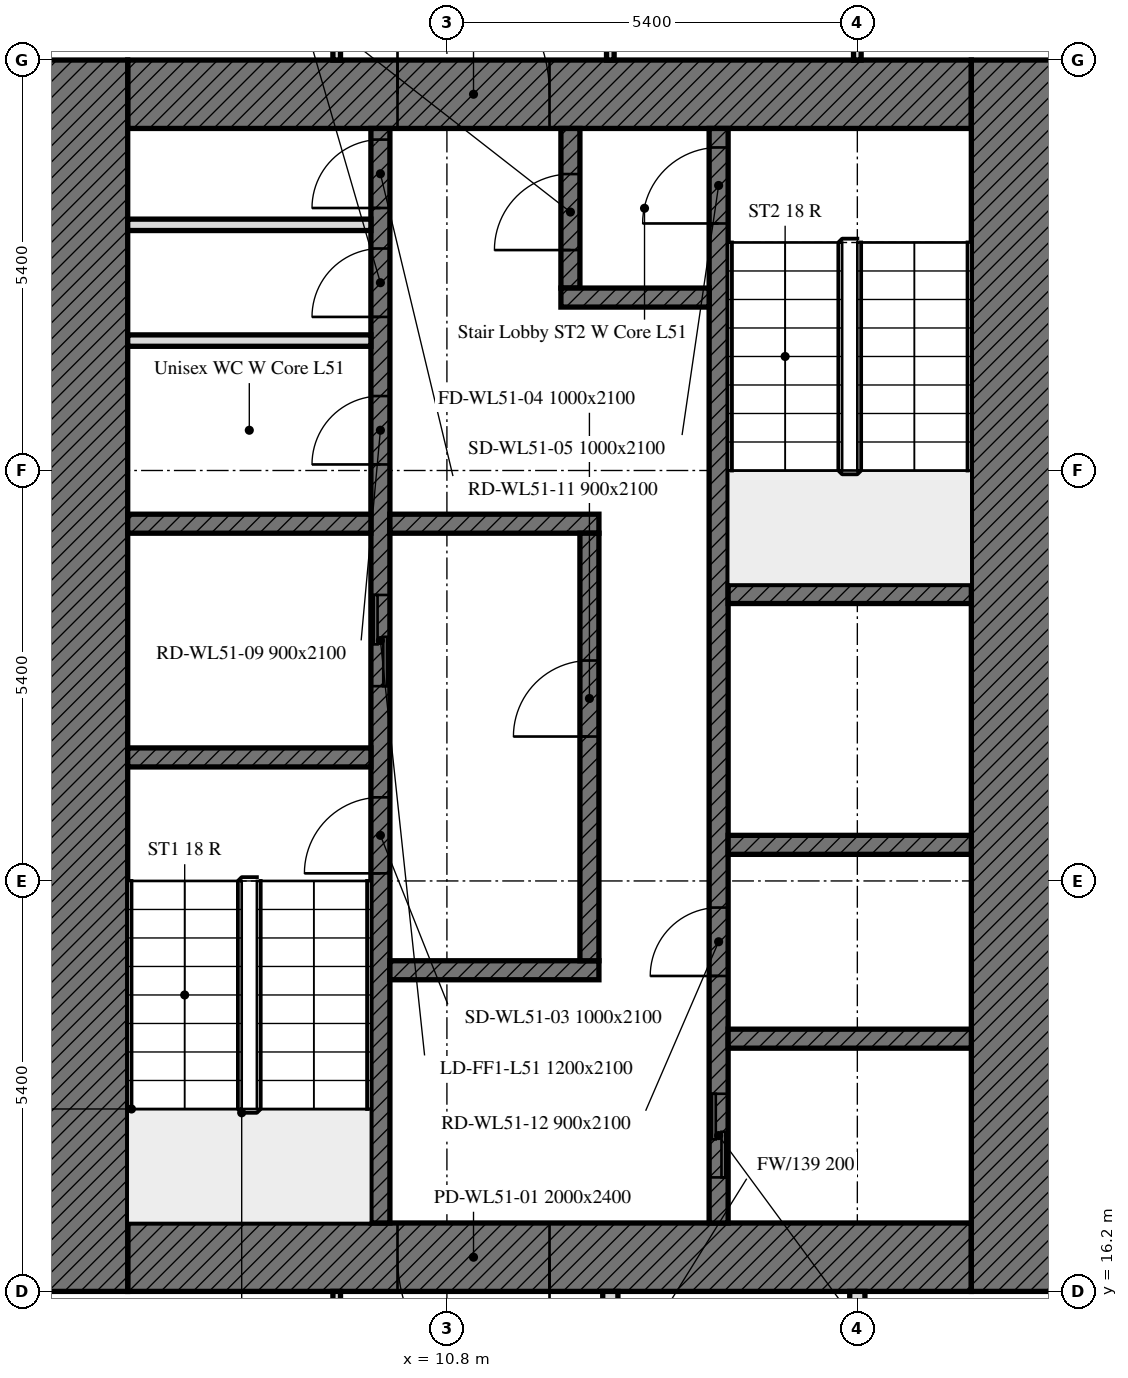
"""IFC4 building model, lengths in metres.
Left out: names, types, materials, properties, quantities, classifications, styles, units other than length and angle.
Written with IfcOpenShell. Run it as: python <this file> out.ifc"""

import sys

from ifc_helpers import new_model, si_unit, direction, frame, frame_2d, origin, place, context, subcontext, project, spatial, rectangle, extrude, element, fill, save


model = new_model("IFC4")
c1 = context("Model", 3, precision=1e-05, world=origin(), true_north=direction((0.0, 1.0)))
c2 = subcontext(c1, "Body", "Model", "MODEL_VIEW")
j1 = project(units=[si_unit("LENGTHUNIT", "METRE"), si_unit("PLANEANGLEUNIT", "RADIAN")], contexts=[c1])
p1 = place(None, origin())
s1 = spatial("IfcSite", under=j1, at=p1, CompositionType="ELEMENT")
p2 = place(p1, origin())
s2 = spatial("IfcBuilding", under=s1, at=p2, CompositionType="ELEMENT")
p3 = place(p2, frame((0.0, 0.0, 207.1)))
s3 = spatial("IfcBuildingStorey", under=s2, at=p3, CompositionType="ELEMENT", Elevation=207.1)
p4 = place(p3, frame((17.7, 16.65, 0.0), z_axis=(0.0, 0.0, 1.0), x_axis=(-1.0, 0.0, 0.0)))
e1 = element("IfcWall", 1, at=p4, inside=s3, PredefinedType="SOLIDWALL", context=c2, shape_type="SweptSolid", body=[
    extrude(rectangle(XDim=11.1, YDim=0.9, at=frame_2d((5.55, 0.0))), origin(), (0.0, 0.0, 1.0), 3.0),
])
p5 = place(p4, frame((5.55, 0.0, 0.0)))
e2 = element("IfcOpeningElement", 2, at=p5, cuts=e1, PredefinedType="OPENING", context=c2, shape_type="SweptSolid", body=[
    extrude(rectangle(XDim=2.0, YDim=2.4, at=frame_2d((1.0, 1.2))), frame((0.0, 0.45, 0.0), z_axis=(0.0, -1.0, 0.0), x_axis=(1.0, 0.0, 0.0)), (0.0, 0.0, 1.0), 0.9),
])
p6 = place(p3, frame((6.6, 31.95, 0.0), z_axis=(0.0, 0.0, 1.0), x_axis=(1.0, 0.0, 0.0)))
e3 = element("IfcWall", 3, at=p6, inside=s3, PredefinedType="SOLIDWALL", context=c2, shape_type="SweptSolid", body=[
    extrude(rectangle(XDim=11.1, YDim=0.9, at=frame_2d((5.55, 0.0))), origin(), (0.0, 0.0, 1.0), 3.0),
])
p7 = place(p6, frame((3.55, 0.0, 0.0)))
e4 = element("IfcOpeningElement", 4, at=p7, cuts=e3, PredefinedType="OPENING", context=c2, shape_type="SweptSolid", body=[
    extrude(rectangle(XDim=2.0, YDim=2.4, at=frame_2d((1.0, 1.2))), frame((0.0, 0.45, 0.0), z_axis=(0.0, -1.0, 0.0), x_axis=(1.0, 0.0, 0.0)), (0.0, 0.0, 1.0), 0.9),
])
for number, where, z_axis, x_axis in (
    (5, (6.0, 16.2, 0.0), (0.0, 0.0, 1.0), (0.0, 1.0, 0.0)),
    (6, (18.3, 32.4, 0.0), (0.0, 0.0, 1.0), (0.0, -1.0, 0.0)),
):
    element("IfcWall", number, at=place(p3, frame(where, z_axis=z_axis, x_axis=x_axis)), inside=s3, PredefinedType="SOLIDWALL", context=c2, shape_type="SweptSolid", body=[
        extrude(rectangle(XDim=16.2, YDim=1.2, at=frame_2d((8.1, 0.0))), origin(), (0.0, 0.0, 1.0), 3.0),
    ])
p8 = place(p3, frame((9.925, 17.1, 0.0), z_axis=(0.0, 0.0, 1.0), x_axis=(0.0, 1.0, 0.0)))
e7 = element("IfcWall", 7, at=p8, inside=s3, PredefinedType="SOLIDWALL", context=c2, shape_type="SweptSolid", body=[
    extrude(rectangle(XDim=14.4, YDim=0.25, at=frame_2d((7.2, 0.0))), origin(), (0.0, 0.0, 1.0), 3.0),
])
p9 = place(p8, frame((4.6, 0.0, 0.0)))
e8 = element("IfcOpeningElement", 8, at=p9, cuts=e7, PredefinedType="OPENING", context=c2, shape_type="SweptSolid", body=[
    extrude(rectangle(XDim=1.0, YDim=2.1, at=frame_2d((0.5, 1.05))), frame((0.0, 0.125, 0.0), z_axis=(0.0, -1.0, 0.0), x_axis=(1.0, 0.0, 0.0)), (0.0, 0.0, 1.0), 0.25),
])
p10 = place(p8, frame((7.062, 0.0, 0.0)))
e9 = element("IfcOpeningElement", 9, at=p10, cuts=e7, PredefinedType="OPENING", context=c2, shape_type="SweptSolid", body=[
    extrude(rectangle(XDim=1.2, YDim=2.1, at=frame_2d((0.6, 1.05))), frame((0.0, 0.125, 0.0), z_axis=(0.0, -1.0, 0.0), x_axis=(1.0, 0.0, 0.0)), (0.0, 0.0, 1.0), 0.25),
])
p11 = place(p8, frame((9.979, 0.0, 0.0)))
e10 = element("IfcOpeningElement", 10, at=p11, cuts=e7, PredefinedType="OPENING", context=c2, shape_type="SweptSolid", body=[
    extrude(rectangle(XDim=0.9, YDim=2.1, at=frame_2d((0.45, 1.05))), frame((0.0, 0.125, 0.0), z_axis=(0.0, -1.0, 0.0), x_axis=(1.0, 0.0, 0.0)), (0.0, 0.0, 1.0), 0.25),
])
p12 = place(p8, frame((11.92, 0.0, 0.0)))
e11 = element("IfcOpeningElement", 11, at=p12, cuts=e7, PredefinedType="OPENING", context=c2, shape_type="SweptSolid", body=[
    extrude(rectangle(XDim=0.9, YDim=2.1, at=frame_2d((0.45, 1.05))), frame((0.0, 0.125, 0.0), z_axis=(0.0, -1.0, 0.0), x_axis=(1.0, 0.0, 0.0)), (0.0, 0.0, 1.0), 0.25),
])
p13 = place(p8, frame((13.354, 0.0, 0.0)))
e12 = element("IfcOpeningElement", 12, at=p13, cuts=e7, PredefinedType="OPENING", context=c2, shape_type="SweptSolid", body=[
    extrude(rectangle(XDim=0.9, YDim=2.1, at=frame_2d((0.45, 1.05))), frame((0.0, 0.125, 0.0), z_axis=(0.0, -1.0, 0.0), x_axis=(1.0, 0.0, 0.0)), (0.0, 0.0, 1.0), 0.25),
])
p14 = place(p3, frame((14.375, 17.1, 0.0), z_axis=(0.0, 0.0, 1.0), x_axis=(0.0, 1.0, 0.0)))
e13 = element("IfcWall", 13, at=p14, inside=s3, PredefinedType="SOLIDWALL", context=c2, shape_type="SweptSolid", body=[
    extrude(rectangle(XDim=14.4, YDim=0.25, at=frame_2d((7.2, 0.0))), origin(), (0.0, 0.0, 1.0), 3.0),
])
p15 = place(p14, frame((13.15, 0.0, 0.0)))
e14 = element("IfcOpeningElement", 14, at=p15, cuts=e13, PredefinedType="OPENING", context=c2, shape_type="SweptSolid", body=[
    extrude(rectangle(XDim=1.0, YDim=2.1, at=frame_2d((0.5, 1.05))), frame((0.0, 0.125, 0.0), z_axis=(0.0, -1.0, 0.0), x_axis=(1.0, 0.0, 0.0)), (0.0, 0.0, 1.0), 0.25),
])
p16 = place(p14, frame((0.6, 0.0, 0.0)))
e15 = element("IfcOpeningElement", 15, at=p16, cuts=e13, PredefinedType="OPENING", context=c2, shape_type="SweptSolid", body=[
    extrude(rectangle(XDim=1.1, YDim=2.1, at=frame_2d((0.55, 1.05))), frame((0.0, 0.125, 0.0), z_axis=(0.0, -1.0, 0.0), x_axis=(1.0, 0.0, 0.0)), (0.0, 0.0, 1.0), 0.25),
])
p17 = place(p14, frame((3.25, 0.0, 0.0)))
e16 = element("IfcOpeningElement", 16, at=p17, cuts=e13, PredefinedType="OPENING", context=c2, shape_type="SweptSolid", body=[
    extrude(rectangle(XDim=0.9, YDim=2.1, at=frame_2d((0.45, 1.05))), frame((0.0, 0.125, 0.0), z_axis=(0.0, -1.0, 0.0), x_axis=(1.0, 0.0, 0.0)), (0.0, 0.0, 1.0), 0.25),
])
for number, where, z_axis, x_axis in (
    (17, (6.6, 23.225, 0.0), (0.0, 0.0, 1.0), (1.0, 0.0, 0.0)),
    (18, (14.5, 25.375, 0.0), (0.0, 0.0, 1.0), (1.0, 0.0, 0.0)),
    (19, (14.5, 22.075, 0.0), (0.0, 0.0, 1.0), (1.0, 0.0, 0.0)),
    (20, (6.6, 26.3, 0.0), (0.0, 0.0, 1.0), (1.0, 0.0, 0.0)),
):
    element("IfcWall", number, at=place(p3, frame(where, z_axis=z_axis, x_axis=x_axis)), inside=s3, PredefinedType="SOLIDWALL", context=c2, shape_type="SweptSolid", body=[
        extrude(rectangle(XDim=3.2, YDim=0.25, at=frame_2d((1.6, 0.0))), origin(), (0.0, 0.0, 1.0), 3.0),
    ])
for number, where, z_axis, x_axis in (
    (21, (10.05, 26.3, 0.0), (0.0, 0.0, 1.0), (1.0, 0.0, 0.0)),
    (22, (10.05, 20.425, 0.0), (0.0, 0.0, 1.0), (1.0, 0.0, 0.0)),
):
    element("IfcWall", number, at=place(p3, frame(where, z_axis=z_axis, x_axis=x_axis)), inside=s3, PredefinedType="SOLIDWALL", context=c2, shape_type="SweptSolid", body=[
        extrude(rectangle(XDim=2.75, YDim=0.25, at=frame_2d((1.375, 0.0))), origin(), (0.0, 0.0, 1.0), 3.0),
    ])
p18 = place(p3, frame((12.425, 29.4, 0.0), z_axis=(0.0, 0.0, 1.0), x_axis=(0.0, 1.0, 0.0)))
e23 = element("IfcWall", 23, at=p18, inside=s3, PredefinedType="SOLIDWALL", context=c2, shape_type="SweptSolid", body=[
    extrude(rectangle(XDim=2.1, YDim=0.25, at=frame_2d((1.05, 0.0))), origin(), (0.0, 0.0, 1.0), 3.0),
])
p19 = place(p18, frame((0.5, 0.0, 0.0)))
e24 = element("IfcOpeningElement", 24, at=p19, cuts=e23, PredefinedType="OPENING", context=c2, shape_type="SweptSolid", body=[
    extrude(rectangle(XDim=1.0, YDim=2.1, at=frame_2d((0.5, 1.05))), frame((0.0, 0.125, 0.0), z_axis=(0.0, -1.0, 0.0), x_axis=(1.0, 0.0, 0.0)), (0.0, 0.0, 1.0), 0.25),
])
p20 = place(p3, frame((12.3, 29.275, 0.0), z_axis=(0.0, 0.0, 1.0), x_axis=(1.0, 0.0, 0.0)))
e25 = element("IfcWall", 25, at=p20, inside=s3, PredefinedType="SOLIDWALL", context=c2, shape_type="SweptSolid", body=[
    extrude(rectangle(XDim=1.95, YDim=0.25, at=frame_2d((0.975, 0.0))), origin(), (0.0, 0.0, 1.0), 3.0),
])
p21 = place(p3, frame((12.675, 20.55, 0.0), z_axis=(0.0, 0.0, 1.0), x_axis=(0.0, 1.0, 0.0)))
e26 = element("IfcWall", 26, at=p21, inside=s3, PredefinedType="SOLIDWALL", context=c2, shape_type="SweptSolid", body=[
    extrude(rectangle(XDim=5.625, YDim=0.25, at=frame_2d((2.812, 0.0))), origin(), (0.0, 0.0, 1.0), 3.0),
])
p22 = place(p21, frame((2.95, 0.0, 0.0)))
e27 = element("IfcOpeningElement", 27, at=p22, cuts=e26, PredefinedType="OPENING", context=c2, shape_type="SweptSolid", body=[
    extrude(rectangle(XDim=1.0, YDim=2.1, at=frame_2d((0.5, 1.05))), frame((0.0, 0.125, 0.0), z_axis=(0.0, -1.0, 0.0), x_axis=(1.0, 0.0, 0.0)), (0.0, 0.0, 1.0), 0.25),
])
p23 = place(p3, frame((14.5, 19.525, 0.0), z_axis=(0.0, 0.0, 1.0), x_axis=(1.0, 0.0, 0.0)))
e28 = element("IfcWall", 28, at=p23, inside=s3, PredefinedType="SOLIDWALL", context=c2, shape_type="SweptSolid", body=[
    extrude(rectangle(XDim=3.2, YDim=0.25, at=frame_2d((1.6, 0.0))), origin(), (0.0, 0.0, 1.0), 3.0),
])
for number, where, z_axis, x_axis in (
    (29, (6.6, 28.709, 0.0), (0.0, 0.0, 1.0), (1.0, 0.0, 0.0)),
    (30, (6.6, 30.232, 0.0), (0.0, 0.0, 1.0), (1.0, 0.0, 0.0)),
):
    element("IfcWall", number, at=place(p3, frame(where, z_axis=z_axis, x_axis=x_axis)), inside=s3, PredefinedType="PARTITIONING", context=c2, shape_type="SweptSolid", body=[
        extrude(rectangle(XDim=3.2, YDim=0.15, at=frame_2d((1.6, 0.0))), origin(), (0.0, 0.0, 1.0), 3.0),
    ])
p24 = place(p3, frame((16.2, 37.405, 0.0), z_axis=(0.0, 0.0, 1.0), x_axis=(0.0, -1.0, 0.0)))
e31 = element("IfcWall", 31, at=p24, inside=s3, PredefinedType="PARTITIONING", context=c2, shape_type="SweptSolid", body=[
    extrude(rectangle(XDim=5.005, YDim=0.1, at=frame_2d((2.502, 0.0))), origin(), (0.0, 0.0, 1.0), 2.4),
])
for number, where, z_axis, x_axis in (
    (32, (12.95, 32.4, 0.0), (0.0, 0.0, 1.0), (0.0, 1.0, 0.0)),
    (33, (9.35, 38.175, 0.0), (0.0, 0.0, 1.0), (0.0, -1.0, 0.0)),
):
    element("IfcWall", number, at=place(p3, frame(where, z_axis=z_axis, x_axis=x_axis)), inside=s3, PredefinedType="PARTITIONING", context=c2, shape_type="SweptSolid", body=[
        extrude(rectangle(XDim=5.775, YDim=0.1, at=frame_2d((2.888, 0.0))), origin(), (0.0, 0.0, 1.0), 2.4),
    ])
p25 = place(p3, frame((16.2, 16.2, 0.0), z_axis=(0.0, 0.0, 1.0), x_axis=(0.0, -1.0, 0.0)))
e34 = element("IfcWall", 34, at=p25, inside=s3, PredefinedType="PARTITIONING", context=c2, shape_type="SweptSolid", body=[
    extrude(rectangle(XDim=2.8, YDim=0.2, at=frame_2d((1.4, 0.0))), origin(), (0.0, 0.0, 1.0), 3.0),
])
p26 = place(p3, frame((9.35, 16.2, 0.0), z_axis=(0.0, 0.0, 1.0), x_axis=(0.0, -1.0, 0.0)))
e35 = element("IfcWall", 35, at=p26, inside=s3, PredefinedType="PARTITIONING", context=c2, shape_type="SweptSolid", body=[
    extrude(rectangle(XDim=2.625, YDim=0.1, at=frame_2d((1.312, 0.0))), origin(), (0.0, 0.0, 1.0), 3.0),
])
p27 = place(p3, frame((12.95, 13.4, 0.0), z_axis=(0.0, 0.0, 1.0), x_axis=(0.0, 1.0, 0.0)))
e36 = element("IfcWall", 36, at=p27, inside=s3, PredefinedType="PARTITIONING", context=c2, shape_type="SweptSolid", body=[
    extrude(rectangle(XDim=2.8, YDim=0.2, at=frame_2d((1.4, 0.0))), origin(), (0.0, 0.0, 1.0), 3.0),
])
p28 = place(p5, origin())
e37 = element("IfcDoor", 37, at=p28, inside=s3, OperationType="DOUBLE_DOOR_SINGLE_SWING", PredefinedType="DOOR", context=c2, shape_type="SweptSolid", body=[
    extrude(rectangle(XDim=2.0, YDim=2.4, at=frame_2d((1.0, 1.2))), frame((0.0, 0.025, 0.0), z_axis=(0.0, -1.0, 0.0), x_axis=(1.0, 0.0, 0.0)), (0.0, 0.0, 1.0), 0.05),
])
fill(e2, e37)
p29 = place(p7, origin())
e38 = element("IfcDoor", 38, at=p29, inside=s3, OperationType="DOUBLE_DOOR_SINGLE_SWING", PredefinedType="DOOR", context=c2, shape_type="SweptSolid", body=[
    extrude(rectangle(XDim=2.0, YDim=2.4, at=frame_2d((1.0, 1.2))), frame((0.0, 0.025, 0.0), z_axis=(0.0, -1.0, 0.0), x_axis=(1.0, 0.0, 0.0)), (0.0, 0.0, 1.0), 0.05),
])
fill(e4, e38)
p30 = place(p9, origin())
e39 = element("IfcDoor", 39, at=p30, inside=s3, OperationType="SINGLE_SWING_LEFT", PredefinedType="DOOR", context=c2, shape_type="SweptSolid", body=[
    extrude(rectangle(XDim=1.0, YDim=2.1, at=frame_2d((0.5, 1.05))), frame((0.0, 0.025, 0.0), z_axis=(0.0, -1.0, 0.0), x_axis=(1.0, 0.0, 0.0)), (0.0, 0.0, 1.0), 0.05),
])
fill(e8, e39)
p31 = place(p22, origin())
e40 = element("IfcDoor", 40, at=p31, inside=s3, OperationType="SINGLE_SWING_LEFT", PredefinedType="DOOR", context=c2, shape_type="SweptSolid", body=[
    extrude(rectangle(XDim=1.0, YDim=2.1, at=frame_2d((0.5, 1.05))), frame((0.0, 0.025, 0.0), z_axis=(0.0, -1.0, 0.0), x_axis=(1.0, 0.0, 0.0)), (0.0, 0.0, 1.0), 0.05),
])
fill(e27, e40)
p32 = place(p15, origin())
e41 = element("IfcDoor", 41, at=p32, inside=s3, OperationType="SINGLE_SWING_LEFT", PredefinedType="DOOR", context=c2, shape_type="SweptSolid", body=[
    extrude(rectangle(XDim=1.0, YDim=2.1, at=frame_2d((0.5, 1.05))), frame((0.0, 0.025, 0.0), z_axis=(0.0, -1.0, 0.0), x_axis=(1.0, 0.0, 0.0)), (0.0, 0.0, 1.0), 0.05),
])
fill(e14, e41)
p33 = place(p19, origin())
e42 = element("IfcDoor", 42, at=p33, inside=s3, OperationType="SINGLE_SWING_LEFT", PredefinedType="DOOR", context=c2, shape_type="SweptSolid", body=[
    extrude(rectangle(XDim=1.0, YDim=2.1, at=frame_2d((0.5, 1.05))), frame((0.0, 0.025, 0.0), z_axis=(0.0, -1.0, 0.0), x_axis=(1.0, 0.0, 0.0)), (0.0, 0.0, 1.0), 0.05),
])
fill(e24, e42)
p34 = place(p10, origin())
e43 = element("IfcDoor", 43, at=p34, inside=s3, OperationType="DOUBLE_DOOR_SLIDING", PredefinedType="DOOR", context=c2, shape_type="SweptSolid", body=[
    extrude(rectangle(XDim=1.2, YDim=2.1, at=frame_2d((0.6, 1.05))), frame((0.0, 0.025, 0.0), z_axis=(0.0, -1.0, 0.0), x_axis=(1.0, 0.0, 0.0)), (0.0, 0.0, 1.0), 0.05),
])
fill(e9, e43)
p35 = place(p16, origin())
e44 = element("IfcDoor", 44, at=p35, inside=s3, OperationType="DOUBLE_DOOR_SLIDING", PredefinedType="DOOR", context=c2, shape_type="SweptSolid", body=[
    extrude(rectangle(XDim=1.1, YDim=2.1, at=frame_2d((0.55, 1.05))), frame((0.0, 0.025, 0.0), z_axis=(0.0, -1.0, 0.0), x_axis=(1.0, 0.0, 0.0)), (0.0, 0.0, 1.0), 0.05),
])
fill(e15, e44)
p36 = place(p11, origin())
e45 = element("IfcDoor", 45, at=p36, inside=s3, OperationType="SINGLE_SWING_LEFT", PredefinedType="DOOR", context=c2, shape_type="SweptSolid", body=[
    extrude(rectangle(XDim=0.9, YDim=2.1, at=frame_2d((0.45, 1.05))), frame((0.0, 0.025, 0.0), z_axis=(0.0, -1.0, 0.0), x_axis=(1.0, 0.0, 0.0)), (0.0, 0.0, 1.0), 0.05),
])
fill(e10, e45)
p37 = place(p12, origin())
e46 = element("IfcDoor", 46, at=p37, inside=s3, OperationType="SINGLE_SWING_LEFT", PredefinedType="DOOR", context=c2, shape_type="SweptSolid", body=[
    extrude(rectangle(XDim=0.9, YDim=2.1, at=frame_2d((0.45, 1.05))), frame((0.0, 0.025, 0.0), z_axis=(0.0, -1.0, 0.0), x_axis=(1.0, 0.0, 0.0)), (0.0, 0.0, 1.0), 0.05),
])
fill(e11, e46)
p38 = place(p13, origin())
e47 = element("IfcDoor", 47, at=p38, inside=s3, OperationType="SINGLE_SWING_LEFT", PredefinedType="DOOR", context=c2, shape_type="SweptSolid", body=[
    extrude(rectangle(XDim=0.9, YDim=2.1, at=frame_2d((0.45, 1.05))), frame((0.0, 0.025, 0.0), z_axis=(0.0, -1.0, 0.0), x_axis=(1.0, 0.0, 0.0)), (0.0, 0.0, 1.0), 0.05),
])
fill(e12, e47)
p39 = place(p17, origin())
e48 = element("IfcDoor", 48, at=p39, inside=s3, OperationType="SINGLE_SWING_LEFT", PredefinedType="DOOR", context=c2, shape_type="SweptSolid", body=[
    extrude(rectangle(XDim=0.9, YDim=2.1, at=frame_2d((0.45, 1.05))), frame((0.0, 0.025, 0.0), z_axis=(0.0, -1.0, 0.0), x_axis=(1.0, 0.0, 0.0)), (0.0, 0.0, 1.0), 0.05),
])
fill(e16, e48)
save(model, sys.argv[1])
